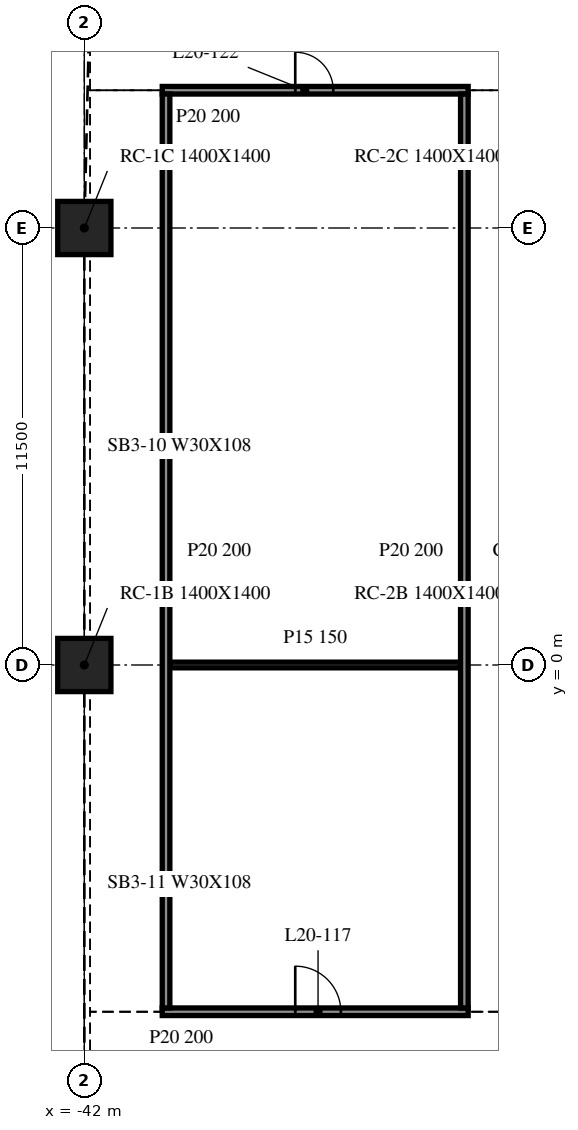
"""IFC4 building model, lengths in metres.
Left out: names, types, materials, properties, quantities, classifications, styles, units other than length and angle.
Written with IfcOpenShell. Run it as: python <this file> out.ifc"""

import sys

from ifc_helpers import new_model, si_unit, direction, frame, frame_2d, origin, origin_2d, place, context, subcontext, project, spatial, rectangle, extrude, element, fill, save


model = new_model("IFC4")
c1 = context("Model", 3, precision=1e-05, world=origin(), true_north=direction((0.0, 1.0)))
c2 = subcontext(c1, "Body", "Model", "MODEL_VIEW")
j1 = project(units=[si_unit("LENGTHUNIT", "METRE"), si_unit("PLANEANGLEUNIT", "RADIAN")], contexts=[c1])
p1 = place(None, origin())
s1 = spatial("IfcSite", under=j1, at=p1, CompositionType="ELEMENT")
p2 = place(p1, origin())
s2 = spatial("IfcBuilding", under=s1, at=p2, CompositionType="ELEMENT")
p3 = place(p2, frame((0.0, 0.0, 88.9)))
s3 = spatial("IfcBuildingStorey", under=s2, at=p3, CompositionType="ELEMENT", Elevation=88.9)
for number, where, z_axis, x_axis in (
    (1, (-42.0, 0.0, -0.34), (0.0, 0.0, 1.0), (1.0, 0.0, 0.0)),
    (2, (-42.0, 11.5, -0.34), (0.0, 0.0, 1.0), (1.0, 0.0, 0.0)),
):
    element("IfcColumn", number, at=place(p3, frame(where, z_axis=z_axis, x_axis=x_axis)), inside=s3, PredefinedType="COLUMN", context=c2, shape_type="SweptSolid", body=[
        extrude(rectangle(XDim=1.4, YDim=1.4, at=origin_2d()), origin(), (0.0, 0.0, 1.0), 4.1),
    ])
p4 = place(p3, frame((-39.95, -9.125, 0.0), z_axis=(0.0, 0.0, 1.0), x_axis=(1.0, 0.0, 0.0)))
e3 = element("IfcWall", 3, at=p4, inside=s3, PredefinedType="PARTITIONING", context=c2, shape_type="SweptSolid", body=[
    extrude(rectangle(XDim=8.05, YDim=0.2, at=frame_2d((4.025, 0.0))), origin(), (0.0, 0.0, 1.0), 3.76),
])
p5 = place(p4, frame((3.5, 0.0, 0.0)))
e4 = element("IfcOpeningElement", 4, at=p5, cuts=e3, PredefinedType="OPENING", context=c2, shape_type="SweptSolid", body=[
    extrude(rectangle(XDim=1.2, YDim=2.1, at=frame_2d((0.6, 1.05))), frame((0.0, 0.11, 0.0), z_axis=(0.0, -1.0, 0.0), x_axis=(1.0, 0.0, 0.0)), (0.0, 0.0, 1.0), 0.22),
])
p6 = place(p3, frame((-39.75, 0.0, 0.0), z_axis=(0.0, 0.0, 1.0), x_axis=(1.0, 0.0, 0.0)))
e5 = element("IfcWall", 5, at=p6, inside=s3, PredefinedType="PARTITIONING", context=c2, shape_type="SweptSolid", body=[
    extrude(rectangle(XDim=7.65, YDim=0.15, at=frame_2d((3.825, 0.0))), origin(), (0.0, 0.0, 1.0), 3.76),
])
p7 = place(p3, frame((-39.95, 15.125, 0.0), z_axis=(0.0, 0.0, 1.0), x_axis=(1.0, 0.0, 0.0)))
e6 = element("IfcWall", 6, at=p7, inside=s3, PredefinedType="PARTITIONING", context=c2, shape_type="SweptSolid", body=[
    extrude(rectangle(XDim=8.05, YDim=0.2, at=frame_2d((4.025, 0.0))), origin(), (0.0, 0.0, 1.0), 3.76),
])
p8 = place(p7, frame((3.5, 0.0, 0.0)))
e7 = element("IfcOpeningElement", 7, at=p8, cuts=e6, PredefinedType="OPENING", context=c2, shape_type="SweptSolid", body=[
    extrude(rectangle(XDim=1.0, YDim=2.1, at=frame_2d((0.5, 1.05))), frame((0.0, 0.11, 0.0), z_axis=(0.0, -1.0, 0.0), x_axis=(1.0, 0.0, 0.0)), (0.0, 0.0, 1.0), 0.22),
])
for number, where, z_axis, x_axis in (
    (8, (-39.85, -9.025, 0.0), (0.0, 0.0, 1.0), (0.0, 1.0, 0.0)),
    (9, (-32.0, -9.025, 0.0), (0.0, 0.0, 1.0), (0.0, 1.0, 0.0)),
):
    element("IfcWall", number, at=place(p3, frame(where, z_axis=z_axis, x_axis=x_axis)), inside=s3, PredefinedType="PARTITIONING", context=c2, shape_type="SweptSolid", body=[
        extrude(rectangle(XDim=24.05, YDim=0.2, at=frame_2d((12.025, 0.0))), origin(), (0.0, 0.0, 1.0), 3.76),
    ])
p9 = place(p5, origin())
e10 = element("IfcDoor", 10, at=p9, inside=s3, OperationType="SINGLE_SWING_RIGHT", PredefinedType="DOOR", context=c2, shape_type="SweptSolid", body=[
    extrude(rectangle(XDim=1.2, YDim=2.1, at=frame_2d((0.6, 1.05))), frame((0.0, 0.025, 0.0), z_axis=(0.0, -1.0, 0.0), x_axis=(1.0, 0.0, 0.0)), (0.0, 0.0, 1.0), 0.05),
])
fill(e4, e10)
p10 = place(p8, origin())
e11 = element("IfcDoor", 11, at=p10, inside=s3, OperationType="SINGLE_SWING_RIGHT", PredefinedType="DOOR", context=c2, shape_type="SweptSolid", body=[
    extrude(rectangle(XDim=1.0, YDim=2.1, at=frame_2d((0.5, 1.05))), frame((0.0, 0.025, 0.0), z_axis=(0.0, -1.0, 0.0), x_axis=(1.0, 0.0, 0.0)), (0.0, 0.0, 1.0), 0.05),
])
fill(e7, e11)
save(model, sys.argv[1])
